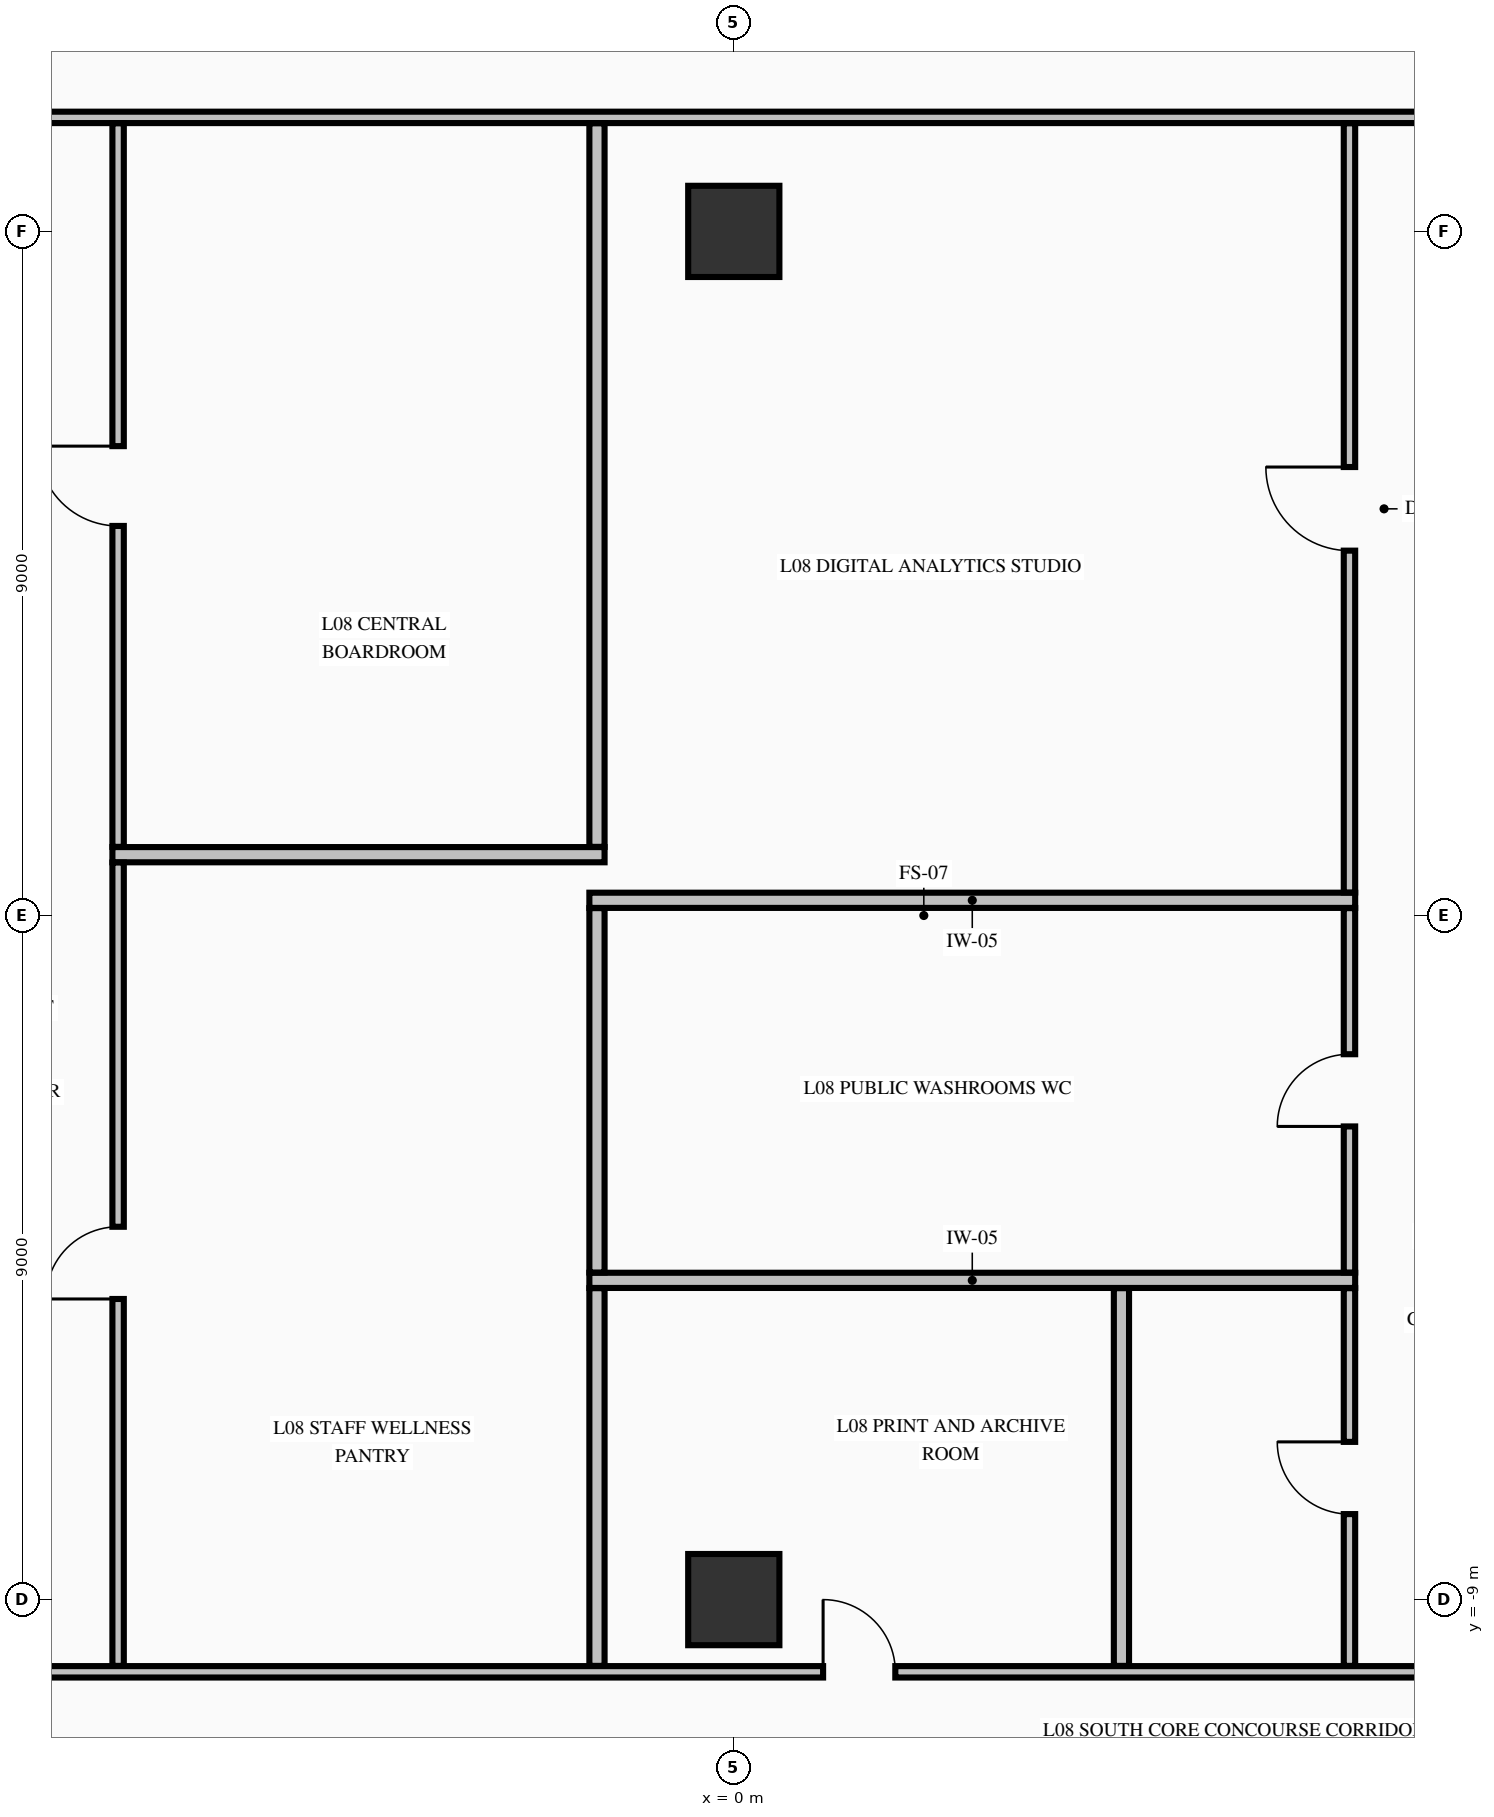
"""IFC4 building model, lengths in metres.
Left out: names, types, materials, properties, quantities, classifications, styles, units other than length and angle.
Written with IfcOpenShell. Run it as: python <this file> out.ifc"""

import sys

from ifc_helpers import new_model, si_unit, direction, frame, frame_2d, origin, origin_2d, place, context, subcontext, project, spatial, rectangle, extrude, element, fill, save


model = new_model("IFC4")
c1 = context("Model", 3, precision=1e-05, world=origin(), true_north=direction((0.0, 1.0)))
c2 = subcontext(c1, "Body", "Model", "MODEL_VIEW")
j1 = project(units=[si_unit("LENGTHUNIT", "METRE"), si_unit("PLANEANGLEUNIT", "RADIAN")], contexts=[c1])
p1 = place(None, origin())
s1 = spatial("IfcSite", under=j1, at=p1, CompositionType="ELEMENT")
p2 = place(p1, origin())
s2 = spatial("IfcBuilding", under=s1, at=p2, CompositionType="ELEMENT")
p3 = place(p2, frame((0.0, 0.0, 37.91)))
s3 = spatial("IfcBuildingStorey", under=s2, at=p3, CompositionType="ELEMENT", Elevation=37.91)
for number, where, z_axis, x_axis in (
    (1, (0.0, -9.0, -0.25), (0.0, 0.0, 1.0), (1.0, 0.0, 0.0)),
    (2, (0.0, 9.0, -0.25), (0.0, 0.0, 1.0), (1.0, 0.0, 0.0)),
):
    element("IfcColumn", number, at=place(p3, frame(where, z_axis=z_axis, x_axis=x_axis)), inside=s3, PredefinedType="COLUMN", context=c2, shape_type="SweptSolid", body=[
        extrude(rectangle(XDim=1.2, YDim=1.2, at=origin_2d()), origin(), (0.0, 0.0, 1.0), 3.57),
    ])
p4 = place(p3, frame((-10.394, -9.95, 0.0), z_axis=(0.0, 0.0, 1.0), x_axis=(1.0, 0.0, 0.0)))
e3 = element("IfcWall", 3, at=p4, inside=s3, PredefinedType="PARTITIONING", context=c2, shape_type="SweptSolid", body=[
    extrude(rectangle(XDim=20.788, YDim=0.15, at=frame_2d((10.394, 0.0))), origin(), (0.0, 0.0, 1.0), 3.32),
])
p5 = place(p4, frame((0.319, 0.0, 0.0)))
e4 = element("IfcOpeningElement", 4, at=p5, cuts=e3, PredefinedType="OPENING", context=c2, shape_type="SweptSolid", body=[
    extrude(rectangle(XDim=1.05, YDim=2.15, at=frame_2d((0.525, 1.075))), frame((0.0, 0.085, 0.0), z_axis=(0.0, -1.0, 0.0), x_axis=(1.0, 0.0, 0.0)), (0.0, 0.0, 1.0), 0.17),
])
p6 = place(p4, frame((19.419, 0.0, 0.0)))
e5 = element("IfcOpeningElement", 5, at=p6, cuts=e3, PredefinedType="OPENING", context=c2, shape_type="SweptSolid", body=[
    extrude(rectangle(XDim=1.05, YDim=2.15, at=frame_2d((0.525, 1.075))), frame((0.0, 0.085, 0.0), z_axis=(0.0, -1.0, 0.0), x_axis=(1.0, 0.0, 0.0)), (0.0, 0.0, 1.0), 0.17),
])
p7 = place(p4, frame((11.569, 0.0, 0.0)))
e6 = element("IfcOpeningElement", 6, at=p7, cuts=e3, PredefinedType="OPENING", context=c2, shape_type="SweptSolid", body=[
    extrude(rectangle(XDim=0.95, YDim=2.15, at=frame_2d((0.475, 1.075))), frame((0.0, 0.085, 0.0), z_axis=(0.0, -1.0, 0.0), x_axis=(1.0, 0.0, 0.0)), (0.0, 0.0, 1.0), 0.17),
])
for number, where, z_axis, x_axis in (
    (7, (-1.9, -4.8, 0.0), (0.0, 0.0, 1.0), (1.0, 0.0, 0.0)),
    (8, (-1.9, 0.2, 0.0), (0.0, 0.0, 1.0), (1.0, 0.0, 0.0)),
):
    element("IfcWall", number, at=place(p3, frame(where, z_axis=z_axis, x_axis=x_axis)), inside=s3, PredefinedType="PARTITIONING", context=c2, shape_type="SweptSolid", body=[
        extrude(rectangle(XDim=10.075, YDim=0.2, at=frame_2d((5.038, 0.0))), origin(), (0.0, 0.0, 1.0), 3.32),
    ])
p8 = place(p3, frame((-8.175, 0.8, 0.0), z_axis=(0.0, 0.0, 1.0), x_axis=(1.0, 0.0, 0.0)))
e9 = element("IfcWall", 9, at=p8, inside=s3, PredefinedType="PARTITIONING", context=c2, shape_type="SweptSolid", body=[
    extrude(rectangle(XDim=6.475, YDim=0.2, at=frame_2d((3.238, 0.0))), origin(), (0.0, 0.0, 1.0), 3.32),
])
p9 = place(p3, frame((-10.394, 10.5, 0.0), z_axis=(0.0, 0.0, 1.0), x_axis=(1.0, 0.0, 0.0)))
e10 = element("IfcWall", 10, at=p9, inside=s3, PredefinedType="PARTITIONING", context=c2, shape_type="SweptSolid", body=[
    extrude(rectangle(XDim=20.788, YDim=0.15, at=frame_2d((10.394, 0.0))), origin(), (0.0, 0.0, 1.0), 3.32),
])
p10 = place(p9, frame((0.319, 0.0, 0.0)))
e11 = element("IfcOpeningElement", 11, at=p10, cuts=e10, PredefinedType="OPENING", context=c2, shape_type="SweptSolid", body=[
    extrude(rectangle(XDim=1.05, YDim=2.15, at=frame_2d((0.525, 1.075))), frame((0.0, 0.085, 0.0), z_axis=(0.0, -1.0, 0.0), x_axis=(1.0, 0.0, 0.0)), (0.0, 0.0, 1.0), 0.17),
])
p11 = place(p9, frame((19.419, 0.0, 0.0)))
e12 = element("IfcOpeningElement", 12, at=p11, cuts=e10, PredefinedType="OPENING", context=c2, shape_type="SweptSolid", body=[
    extrude(rectangle(XDim=1.05, YDim=2.15, at=frame_2d((0.525, 1.075))), frame((0.0, 0.085, 0.0), z_axis=(0.0, -1.0, 0.0), x_axis=(1.0, 0.0, 0.0)), (0.0, 0.0, 1.0), 0.17),
])
p12 = place(p3, frame((-8.1, -9.872, 0.0), z_axis=(0.0, 0.0, 1.0), x_axis=(0.0, 1.0, 0.0)))
e13 = element("IfcWall", 13, at=p12, inside=s3, PredefinedType="PARTITIONING", context=c2, shape_type="SweptSolid", body=[
    extrude(rectangle(XDim=10.569, YDim=0.15, at=frame_2d((5.285, 0.0))), origin(), (0.0, 0.0, 1.0), 3.32),
])
p13 = place(p12, frame((4.827, 0.0, 0.0)))
e14 = element("IfcOpeningElement", 14, at=p13, cuts=e13, PredefinedType="OPENING", context=c2, shape_type="SweptSolid", body=[
    extrude(rectangle(XDim=0.95, YDim=2.15, at=frame_2d((0.475, 1.075))), frame((0.0, 0.085, 0.0), z_axis=(0.0, -1.0, 0.0), x_axis=(1.0, 0.0, 0.0)), (0.0, 0.0, 1.0), 0.17),
])
p14 = place(p3, frame((-8.1, 0.903, 0.0), z_axis=(0.0, 0.0, 1.0), x_axis=(0.0, 1.0, 0.0)))
e15 = element("IfcWall", 15, at=p14, inside=s3, PredefinedType="PARTITIONING", context=c2, shape_type="SweptSolid", body=[
    extrude(rectangle(XDim=9.519, YDim=0.15, at=frame_2d((4.76, 0.0))), origin(), (0.0, 0.0, 1.0), 3.32),
])
p15 = place(p14, frame((4.222, 0.0, 0.0)))
e16 = element("IfcOpeningElement", 16, at=p15, cuts=e15, PredefinedType="OPENING", context=c2, shape_type="SweptSolid", body=[
    extrude(rectangle(XDim=1.05, YDim=2.15, at=frame_2d((0.525, 1.075))), frame((0.0, 0.085, 0.0), z_axis=(0.0, -1.0, 0.0), x_axis=(1.0, 0.0, 0.0)), (0.0, 0.0, 1.0), 0.17),
])
p16 = place(p3, frame((-1.8, -9.872, 0.0), z_axis=(0.0, 0.0, 1.0), x_axis=(0.0, 1.0, 0.0)))
e17 = element("IfcWall", 17, at=p16, inside=s3, PredefinedType="PARTITIONING", context=c2, shape_type="SweptSolid", body=[
    extrude(rectangle(XDim=4.969, YDim=0.2, at=frame_2d((2.484, 0.0))), origin(), (0.0, 0.0, 1.0), 3.32),
])
p17 = place(p3, frame((-1.8, -4.697, 0.0), z_axis=(0.0, 0.0, 1.0), x_axis=(0.0, 1.0, 0.0)))
e18 = element("IfcWall", 18, at=p17, inside=s3, PredefinedType="PARTITIONING", context=c2, shape_type="SweptSolid", body=[
    extrude(rectangle(XDim=4.794, YDim=0.2, at=frame_2d((2.397, 0.0))), origin(), (0.0, 0.0, 1.0), 3.32),
])
p18 = place(p3, frame((-1.8, 0.903, 0.0), z_axis=(0.0, 0.0, 1.0), x_axis=(0.0, 1.0, 0.0)))
e19 = element("IfcWall", 19, at=p18, inside=s3, PredefinedType="PARTITIONING", context=c2, shape_type="SweptSolid", body=[
    extrude(rectangle(XDim=9.519, YDim=0.2, at=frame_2d((4.76, 0.0))), origin(), (0.0, 0.0, 1.0), 3.32),
])
p19 = place(p3, frame((5.1, -9.872, 0.0), z_axis=(0.0, 0.0, 1.0), x_axis=(0.0, 1.0, 0.0)))
e20 = element("IfcWall", 20, at=p19, inside=s3, PredefinedType="PARTITIONING", context=c2, shape_type="SweptSolid", body=[
    extrude(rectangle(XDim=4.969, YDim=0.2, at=frame_2d((2.484, 0.0))), origin(), (0.0, 0.0, 1.0), 3.32),
])
p20 = place(p3, frame((8.1, -9.872, 0.0), z_axis=(0.0, 0.0, 1.0), x_axis=(0.0, 1.0, 0.0)))
e21 = element("IfcWall", 21, at=p20, inside=s3, PredefinedType="PARTITIONING", context=c2, shape_type="SweptSolid", body=[
    extrude(rectangle(XDim=4.969, YDim=0.15, at=frame_2d((2.484, 0.0))), origin(), (0.0, 0.0, 1.0), 3.32),
])
p21 = place(p20, frame((1.997, 0.0, 0.0)))
e22 = element("IfcOpeningElement", 22, at=p21, cuts=e21, PredefinedType="OPENING", context=c2, shape_type="SweptSolid", body=[
    extrude(rectangle(XDim=0.95, YDim=2.15, at=frame_2d((0.475, 1.075))), frame((0.0, 0.085, 0.0), z_axis=(0.0, -1.0, 0.0), x_axis=(1.0, 0.0, 0.0)), (0.0, 0.0, 1.0), 0.17),
])
p22 = place(p3, frame((8.1, -4.697, 0.0), z_axis=(0.0, 0.0, 1.0), x_axis=(0.0, 1.0, 0.0)))
e23 = element("IfcWall", 23, at=p22, inside=s3, PredefinedType="PARTITIONING", context=c2, shape_type="SweptSolid", body=[
    extrude(rectangle(XDim=4.794, YDim=0.15, at=frame_2d((2.397, 0.0))), origin(), (0.0, 0.0, 1.0), 3.32),
])
p23 = place(p22, frame((1.922, 0.0, 0.0)))
e24 = element("IfcOpeningElement", 24, at=p23, cuts=e23, PredefinedType="OPENING", context=c2, shape_type="SweptSolid", body=[
    extrude(rectangle(XDim=0.95, YDim=2.15, at=frame_2d((0.475, 1.075))), frame((0.0, 0.085, 0.0), z_axis=(0.0, -1.0, 0.0), x_axis=(1.0, 0.0, 0.0)), (0.0, 0.0, 1.0), 0.17),
])
p24 = place(p3, frame((8.1, 0.303, 0.0), z_axis=(0.0, 0.0, 1.0), x_axis=(0.0, 1.0, 0.0)))
e25 = element("IfcWall", 25, at=p24, inside=s3, PredefinedType="PARTITIONING", context=c2, shape_type="SweptSolid", body=[
    extrude(rectangle(XDim=10.119, YDim=0.15, at=frame_2d((5.06, 0.0))), origin(), (0.0, 0.0, 1.0), 3.32),
])
p25 = place(p24, frame((4.497, 0.0, 0.0)))
e26 = element("IfcOpeningElement", 26, at=p25, cuts=e25, PredefinedType="OPENING", context=c2, shape_type="SweptSolid", body=[
    extrude(rectangle(XDim=1.1, YDim=2.15, at=frame_2d((0.55, 1.075))), frame((0.0, 0.085, 0.0), z_axis=(0.0, -1.0, 0.0), x_axis=(1.0, 0.0, 0.0)), (0.0, 0.0, 1.0), 0.17),
])
p26 = place(p15, origin())
e27 = element("IfcDoor", 27, at=p26, inside=s3, OperationType="SINGLE_SWING_RIGHT", PredefinedType="DOOR", context=c2, shape_type="SweptSolid", body=[
    extrude(rectangle(XDim=1.05, YDim=2.15, at=frame_2d((0.525, 1.075))), frame((0.0, 0.025, 0.0), z_axis=(0.0, -1.0, 0.0), x_axis=(1.0, 0.0, 0.0)), (0.0, 0.0, 1.0), 0.05),
])
fill(e16, e27)
p27 = place(p13, origin())
e28 = element("IfcDoor", 28, at=p27, inside=s3, OperationType="SINGLE_SWING_LEFT", PredefinedType="DOOR", context=c2, shape_type="SweptSolid", body=[
    extrude(rectangle(XDim=0.95, YDim=2.15, at=frame_2d((0.475, 1.075))), frame((0.0, 0.025, 0.0), z_axis=(0.0, -1.0, 0.0), x_axis=(1.0, 0.0, 0.0)), (0.0, 0.0, 1.0), 0.05),
])
fill(e14, e28)
p28 = place(p25, origin())
e29 = element("IfcDoor", 29, at=p28, inside=s3, OperationType="SINGLE_SWING_RIGHT", PredefinedType="DOOR", context=c2, shape_type="SweptSolid", body=[
    extrude(rectangle(XDim=1.1, YDim=2.15, at=frame_2d((0.55, 1.075))), frame((0.0, 0.025, 0.0), z_axis=(0.0, -1.0, 0.0), x_axis=(1.0, 0.0, 0.0)), (0.0, 0.0, 1.0), 0.05),
])
fill(e26, e29)
p29 = place(p23, origin())
e30 = element("IfcDoor", 30, at=p29, inside=s3, OperationType="SINGLE_SWING_LEFT", PredefinedType="DOOR", context=c2, shape_type="SweptSolid", body=[
    extrude(rectangle(XDim=0.95, YDim=2.15, at=frame_2d((0.475, 1.075))), frame((0.0, 0.025, 0.0), z_axis=(0.0, -1.0, 0.0), x_axis=(1.0, 0.0, 0.0)), (0.0, 0.0, 1.0), 0.05),
])
fill(e24, e30)
p30 = place(p21, origin())
e31 = element("IfcDoor", 31, at=p30, inside=s3, OperationType="SINGLE_SWING_RIGHT", PredefinedType="DOOR", context=c2, shape_type="SweptSolid", body=[
    extrude(rectangle(XDim=0.95, YDim=2.15, at=frame_2d((0.475, 1.075))), frame((0.0, 0.025, 0.0), z_axis=(0.0, -1.0, 0.0), x_axis=(1.0, 0.0, 0.0)), (0.0, 0.0, 1.0), 0.05),
])
fill(e22, e31)
p31 = place(p7, origin())
e32 = element("IfcDoor", 32, at=p31, inside=s3, OperationType="SINGLE_SWING_LEFT", PredefinedType="DOOR", context=c2, shape_type="SweptSolid", body=[
    extrude(rectangle(XDim=0.95, YDim=2.15, at=frame_2d((0.475, 1.075))), frame((0.0, 0.025, 0.0), z_axis=(0.0, -1.0, 0.0), x_axis=(1.0, 0.0, 0.0)), (0.0, 0.0, 1.0), 0.05),
])
fill(e6, e32)
save(model, sys.argv[1])
